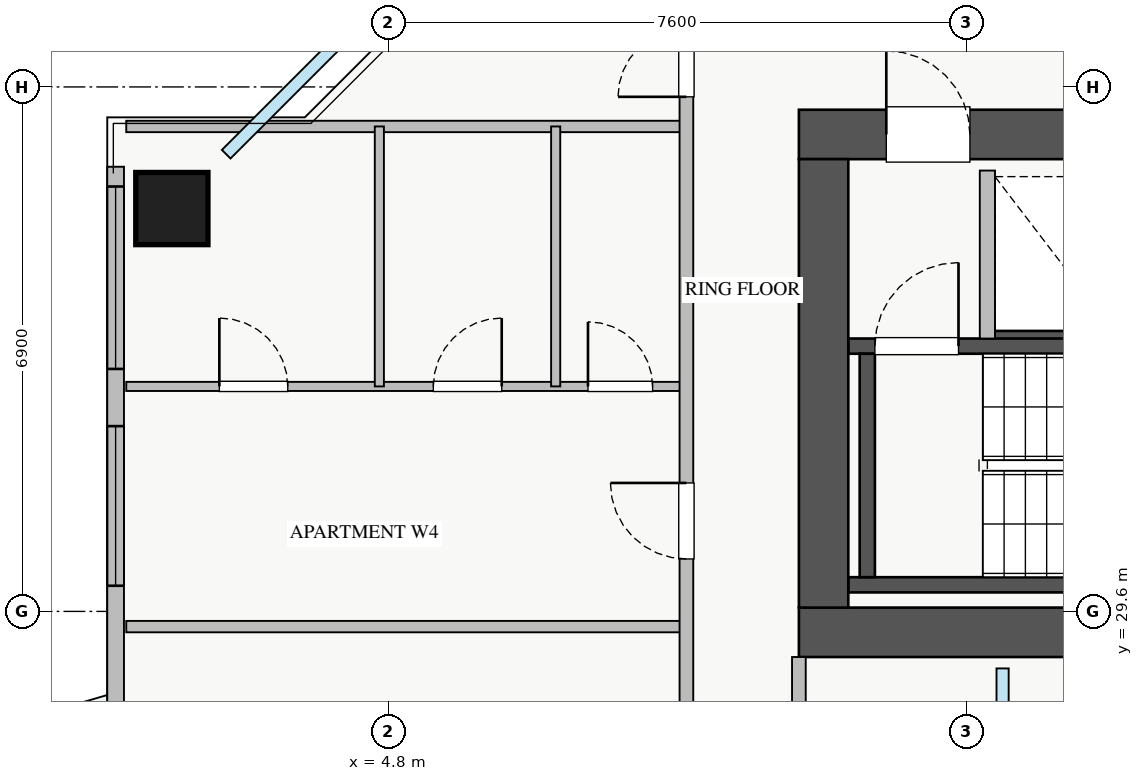
"""IFC4 building model, lengths in metres.
Left out: names, types, materials, properties, quantities, classifications, styles, units other than length and angle.
Written with IfcOpenShell. Run it as: python <this file> out.ifc"""

import sys

from ifc_helpers import new_model, si_unit, direction, frame, frame_2d, origin, origin_2d, place, context, subcontext, project, spatial, rectangle, extrude, source, transform, mapped, element, fill, save


model = new_model("IFC4")
c1 = context("Model", 3, precision=1e-05, world=origin(), true_north=direction((0.0, 1.0)))
c2 = subcontext(c1, "Body", "Model", "MODEL_VIEW")
j1 = project(units=[si_unit("LENGTHUNIT", "METRE"), si_unit("PLANEANGLEUNIT", "RADIAN")], contexts=[c1])
p1 = place(None, origin())
s1 = spatial("IfcSite", under=j1, at=p1, CompositionType="ELEMENT")
p2 = place(p1, origin())
s2 = spatial("IfcBuilding", under=s1, at=p2, CompositionType="ELEMENT")
p3 = place(p2, frame((0.0, 0.0, 179.5)))
s3 = spatial("IfcBuildingStorey", under=s2, at=p3, CompositionType="ELEMENT", Elevation=179.5)
p4 = place(p3, frame((12.68, 33.2, 0.0), z_axis=(0.0, 0.0, 1.0), x_axis=(1.0, 0.0, 0.0)))
e1 = element("IfcWall", 1, at=p4, inside=s3, PredefinedType="SHEAR", context=c2, shape_type="SweptSolid", body=[
    extrude(rectangle(XDim=1.94, YDim=0.18, at=frame_2d((0.97, 0.0))), origin(), (0.0, 0.0, 1.0), 3.07),
])
p5 = place(p3, frame((10.85, 29.95, 0.0), z_axis=(0.0, 0.0, 1.0), x_axis=(1.0, 0.0, 0.0)))
e2 = element("IfcWall", 2, at=p5, inside=s3, PredefinedType="SHEAR", context=c2, shape_type="SweptSolid", body=[
    extrude(rectangle(XDim=7.3, YDim=0.2, at=frame_2d((3.65, 0.0))), origin(), (0.0, 0.0, 1.0), 3.25),
])
p6 = place(p3, frame((10.85, 33.09, 0.0), z_axis=(0.0, 0.0, 1.0), x_axis=(1.0, 0.0, 0.0)))
e3 = element("IfcWall", 3, at=p6, inside=s3, PredefinedType="SHEAR", context=c2, shape_type="SweptSolid", body=[
    extrude(rectangle(XDim=7.3, YDim=0.2, at=frame_2d((3.65, 0.0))), origin(), (0.0, 0.0, 1.0), 3.25),
])
p7 = place(p6, frame((0.35, 0.0, 0.0)))
e4 = element("IfcOpeningElement", 4, at=p7, cuts=e3, PredefinedType="OPENING", context=c2, shape_type="SweptSolid", body=[
    extrude(rectangle(XDim=1.1, YDim=2.05, at=frame_2d((0.55, 1.025))), frame((0.0, 0.11, 0.0), z_axis=(0.0, -1.0, 0.0), x_axis=(1.0, 0.0, 0.0)), (0.0, 0.0, 1.0), 0.22),
])
p8 = place(p3, frame((11.1, 30.05, 0.0), z_axis=(0.0, 0.0, 1.0), x_axis=(0.0, 1.0, 0.0)))
e5 = element("IfcWall", 5, at=p8, inside=s3, PredefinedType="SHEAR", context=c2, shape_type="SweptSolid", body=[
    extrude(rectangle(XDim=2.94, YDim=0.2, at=frame_2d((1.47, 0.0))), origin(), (0.0, 0.0, 1.0), 3.25),
])
p9 = place(p3, frame((10.2, 29.325, 0.0), z_axis=(0.0, 0.0, 1.0), x_axis=(1.0, 0.0, 0.0)))
e6 = element("IfcWall", 6, at=p9, inside=s3, PredefinedType="SHEAR", context=c2, shape_type="SweptSolid", body=[
    extrude(rectangle(XDim=17.6, YDim=0.65, at=frame_2d((8.8, 0.0))), origin(), (0.0, 0.0, 1.0), 3.25),
])
p10 = place(p3, frame((10.2, 35.875, 0.0), z_axis=(0.0, 0.0, 1.0), x_axis=(1.0, 0.0, 0.0)))
e7 = element("IfcWall", 7, at=p10, inside=s3, PredefinedType="SHEAR", context=c2, shape_type="SweptSolid", body=[
    extrude(rectangle(XDim=17.6, YDim=0.65, at=frame_2d((8.8, 0.0))), origin(), (0.0, 0.0, 1.0), 3.25),
])
p11 = place(p10, frame((1.15, 0.0, 0.0)))
e8 = element("IfcOpeningElement", 8, at=p11, cuts=e7, PredefinedType="OPENING", context=c2, shape_type="SweptSolid", body=[
    extrude(rectangle(XDim=1.1, YDim=2.05, at=frame_2d((0.55, 1.025))), frame((0.0, 0.335, 0.0), z_axis=(0.0, -1.0, 0.0), x_axis=(1.0, 0.0, 0.0)), (0.0, 0.0, 1.0), 0.67),
])
p12 = place(p10, frame((8.3, 0.0, 0.0)))
e9 = element("IfcOpeningElement", 9, at=p12, cuts=e7, PredefinedType="OPENING", context=c2, shape_type="SweptSolid", body=[
    extrude(rectangle(XDim=1.1, YDim=2.05, at=frame_2d((0.55, 1.025))), frame((0.0, 0.335, 0.0), z_axis=(0.0, -1.0, 0.0), x_axis=(1.0, 0.0, 0.0)), (0.0, 0.0, 1.0), 0.67),
])
p13 = place(p10, frame((4.9, 0.0, 0.0)))
e10 = element("IfcOpeningElement", 10, at=p13, cuts=e7, PredefinedType="OPENING", context=c2, shape_type="SweptSolid", body=[
    extrude(rectangle(XDim=1.1, YDim=2.05, at=frame_2d((0.55, 1.025))), frame((0.0, 0.335, 0.0), z_axis=(0.0, -1.0, 0.0), x_axis=(1.0, 0.0, 0.0)), (0.0, 0.0, 1.0), 0.67),
])
p14 = place(p10, frame((14.74, 0.0, 0.0)))
e11 = element("IfcOpeningElement", 11, at=p14, cuts=e7, PredefinedType="OPENING", context=c2, shape_type="SweptSolid", body=[
    extrude(rectangle(XDim=1.0, YDim=2.05, at=frame_2d((0.5, 1.025))), frame((0.0, 0.335, 0.0), z_axis=(0.0, -1.0, 0.0), x_axis=(1.0, 0.0, 0.0)), (0.0, 0.0, 1.0), 0.67),
])
p15 = place(p10, frame((10.25, 0.0, 0.0)))
e12 = element("IfcOpeningElement", 12, at=p15, cuts=e7, PredefinedType="OPENING", context=c2, shape_type="SweptSolid", body=[
    extrude(rectangle(XDim=1.0, YDim=2.05, at=frame_2d((0.5, 1.025))), frame((0.0, 0.335, 0.0), z_axis=(0.0, -1.0, 0.0), x_axis=(1.0, 0.0, 0.0)), (0.0, 0.0, 1.0), 0.67),
])
p16 = place(p10, frame((12.7, 0.0, 0.0)))
e13 = element("IfcOpeningElement", 13, at=p16, cuts=e7, PredefinedType="OPENING", context=c2, shape_type="SweptSolid", body=[
    extrude(rectangle(XDim=1.0, YDim=2.05, at=frame_2d((0.5, 1.025))), frame((0.0, 0.335, 0.0), z_axis=(0.0, -1.0, 0.0), x_axis=(1.0, 0.0, 0.0)), (0.0, 0.0, 1.0), 0.67),
])
p17 = place(p3, frame((10.525, 29.65, 0.0), z_axis=(0.0, 0.0, 1.0), x_axis=(0.0, 1.0, 0.0)))
e14 = element("IfcWall", 14, at=p17, inside=s3, PredefinedType="SHEAR", context=c2, shape_type="SweptSolid", body=[
    extrude(rectangle(XDim=5.9, YDim=0.65, at=frame_2d((2.95, 0.0))), origin(), (0.0, 0.0, 1.0), 3.25),
])
m1 = source(origin(), c2, "Body", "SweptSolid", [
    extrude(rectangle(XDim=0.95, YDim=0.95, at=origin_2d()), origin(), (0.0, 0.0, 1.0), 3.25),
])
p18 = place(p3, frame((1.95, 34.9, 0.0), z_axis=(0.0, 0.0, 1.0), x_axis=(1.0, 0.0, 0.0)))
e15 = element("IfcColumn", 15, at=p18, inside=s3, PredefinedType="COLUMN", context=c2, shape_type="MappedRepresentation", body=[
    mapped(m1, transform((0.0, 0.0, 0.0), x_axis=(1.0, 0.0, 0.0), y_axis=(0.0, 1.0, 0.0), z_axis=(0.0, 0.0, 1.0), scale=1.0)),
])
p19 = place(p3, frame((1.21, 10.55, 0.0), z_axis=(0.0, 0.0, 1.0), x_axis=(0.0, 1.0, 0.0)))
e16 = element("IfcWall", 16, at=p19, inside=s3, PredefinedType="STANDARD", context=c2, shape_type="SweptSolid", body=[
    extrude(rectangle(XDim=24.9, YDim=0.22, at=frame_2d((12.45, 0.0))), origin(), (0.0, 0.0, 1.0), 2.61),
])
p20 = place(p19, frame((13.3, 0.0, 0.0)))
e17 = element("IfcOpeningElement", 17, at=p20, cuts=e16, PredefinedType="OPENING", context=c2, shape_type="SweptSolid", body=[
    extrude(rectangle(XDim=1.2, YDim=2.1, at=frame_2d((0.6, 1.05))), frame((0.0, 0.12, 0.0), z_axis=(0.0, -1.0, 0.0), x_axis=(1.0, 0.0, 0.0)), (0.0, 0.0, 1.0), 0.24),
])
p21 = place(p19, frame((2.573, 0.0, 0.9)))
e18 = element("IfcOpeningElement", 18, at=p21, cuts=e16, PredefinedType="OPENING", context=c2, shape_type="SweptSolid", body=[
    extrude(rectangle(XDim=2.1, YDim=1.5, at=frame_2d((1.05, 0.75))), frame((0.0, 0.12, 0.0), z_axis=(0.0, -1.0, 0.0), x_axis=(1.0, 0.0, 0.0)), (0.0, 0.0, 1.0), 0.24),
])
p22 = place(p19, frame((19.387, 0.0, 0.9)))
e19 = element("IfcOpeningElement", 19, at=p22, cuts=e16, PredefinedType="OPENING", context=c2, shape_type="SweptSolid", body=[
    extrude(rectangle(XDim=2.1, YDim=1.5, at=frame_2d((1.05, 0.75))), frame((0.0, 0.12, 0.0), z_axis=(0.0, -1.0, 0.0), x_axis=(1.0, 0.0, 0.0)), (0.0, 0.0, 1.0), 0.24),
])
p23 = place(p19, frame((22.24, 0.0, 0.9)))
e20 = element("IfcOpeningElement", 20, at=p23, cuts=e16, PredefinedType="OPENING", context=c2, shape_type="SweptSolid", body=[
    extrude(rectangle(XDim=2.4, YDim=1.5, at=frame_2d((1.2, 0.75))), frame((0.0, 0.12, 0.0), z_axis=(0.0, -1.0, 0.0), x_axis=(1.0, 0.0, 0.0)), (0.0, 0.0, 1.0), 0.24),
])
p24 = place(p19, frame((0.25, 0.0, 0.9)))
e21 = element("IfcOpeningElement", 21, at=p24, cuts=e16, PredefinedType="OPENING", context=c2, shape_type="SweptSolid", body=[
    extrude(rectangle(XDim=0.9, YDim=1.2, at=frame_2d((0.45, 0.6))), frame((0.0, 0.12, 0.0), z_axis=(0.0, -1.0, 0.0), x_axis=(1.0, 0.0, 0.0)), (0.0, 0.0, 1.0), 0.24),
])
p25 = place(p19, frame((8.01, 0.0, 0.9)))
e22 = element("IfcOpeningElement", 22, at=p25, cuts=e16, PredefinedType="OPENING", context=c2, shape_type="SweptSolid", body=[
    extrude(rectangle(XDim=0.9, YDim=1.2, at=frame_2d((0.45, 0.6))), frame((0.0, 0.12, 0.0), z_axis=(0.0, -1.0, 0.0), x_axis=(1.0, 0.0, 0.0)), (0.0, 0.0, 1.0), 0.24),
])
p26 = place(p19, frame((5.215, 0.0, 0.9)))
e23 = element("IfcOpeningElement", 23, at=p26, cuts=e16, PredefinedType="OPENING", context=c2, shape_type="SweptSolid", body=[
    extrude(rectangle(XDim=0.9, YDim=1.2, at=frame_2d((0.45, 0.6))), frame((0.0, 0.12, 0.0), z_axis=(0.0, -1.0, 0.0), x_axis=(1.0, 0.0, 0.0)), (0.0, 0.0, 1.0), 0.24),
])
p27 = place(p3, frame((12.68, 33.19, 0.0), z_axis=(0.0, 0.0, 1.0), x_axis=(0.0, 1.0, 0.0)))
e24 = element("IfcWall", 24, at=p27, inside=s3, PredefinedType="PARTITIONING", context=c2, shape_type="SweptSolid", body=[
    extrude(rectangle(XDim=2.21, YDim=0.2, at=frame_2d((1.105, 0.0))), origin(), (0.0, 0.0, 1.0), 3.07),
])
p28 = place(p3, frame((1.35, 35.98, 0.0), z_axis=(0.0, 0.0, 1.0), x_axis=(1.0, 0.0, 0.0)))
e25 = element("IfcWall", 25, at=p28, inside=s3, PredefinedType="PARTITIONING", context=c2, shape_type="SweptSolid", body=[
    extrude(rectangle(XDim=7.37, YDim=0.15, at=frame_2d((3.685, 0.0))), origin(), (0.0, 0.0, 1.0), 3.07),
])
p29 = place(p3, frame((1.35, 32.56, 0.0), z_axis=(0.0, 0.0, 1.0), x_axis=(1.0, 0.0, 0.0)))
e26 = element("IfcWall", 26, at=p29, inside=s3, PredefinedType="PLUMBINGWALL", context=c2, shape_type="SweptSolid", body=[
    extrude(rectangle(XDim=7.37, YDim=0.12, at=frame_2d((3.685, 0.0))), origin(), (0.0, 0.0, 1.0), 3.07),
])
p30 = place(p29, frame((1.225, 0.0, 0.0)))
e27 = element("IfcOpeningElement", 27, at=p30, cuts=e26, PredefinedType="OPENING", context=c2, shape_type="SweptSolid", body=[
    extrude(rectangle(XDim=0.9, YDim=2.05, at=frame_2d((0.45, 1.025))), frame((0.0, 0.07, 0.0), z_axis=(0.0, -1.0, 0.0), x_axis=(1.0, 0.0, 0.0)), (0.0, 0.0, 1.0), 0.14),
])
p31 = place(p29, frame((4.04, 0.0, 0.0)))
e28 = element("IfcOpeningElement", 28, at=p31, cuts=e26, PredefinedType="OPENING", context=c2, shape_type="SweptSolid", body=[
    extrude(rectangle(XDim=0.9, YDim=2.05, at=frame_2d((0.45, 1.025))), frame((0.0, 0.07, 0.0), z_axis=(0.0, -1.0, 0.0), x_axis=(1.0, 0.0, 0.0)), (0.0, 0.0, 1.0), 0.14),
])
p32 = place(p29, frame((6.075, 0.0, 0.0)))
e29 = element("IfcOpeningElement", 29, at=p32, cuts=e26, PredefinedType="OPENING", context=c2, shape_type="SweptSolid", body=[
    extrude(rectangle(XDim=0.85, YDim=2.05, at=frame_2d((0.425, 1.025))), frame((0.0, 0.07, 0.0), z_axis=(0.0, -1.0, 0.0), x_axis=(1.0, 0.0, 0.0)), (0.0, 0.0, 1.0), 0.14),
])
p33 = place(p3, frame((4.68, 32.56, 0.0), z_axis=(0.0, 0.0, 1.0), x_axis=(0.0, 1.0, 0.0)))
e30 = element("IfcWall", 30, at=p33, inside=s3, PredefinedType="PLUMBINGWALL", context=c2, shape_type="SweptSolid", body=[
    extrude(rectangle(XDim=3.42, YDim=0.12, at=frame_2d((1.71, 0.0))), origin(), (0.0, 0.0, 1.0), 3.07),
])
p34 = place(p3, frame((7.0, 32.56, 0.0), z_axis=(0.0, 0.0, 1.0), x_axis=(0.0, 1.0, 0.0)))
e31 = element("IfcWall", 31, at=p34, inside=s3, PredefinedType="PLUMBINGWALL", context=c2, shape_type="SweptSolid", body=[
    extrude(rectangle(XDim=3.42, YDim=0.12, at=frame_2d((1.71, 0.0))), origin(), (0.0, 0.0, 1.0), 2.565),
])
p35 = place(p3, frame((1.35, 29.4, 0.0), z_axis=(0.0, 0.0, 1.0), x_axis=(1.0, 0.0, 0.0)))
e32 = element("IfcWall", 32, at=p35, inside=s3, PredefinedType="PARTITIONING", context=c2, shape_type="SweptSolid", body=[
    extrude(rectangle(XDim=7.37, YDim=0.15, at=frame_2d((3.685, 0.0))), origin(), (0.0, 0.0, 1.0), 3.07),
])
p36 = place(p3, frame((8.72, 8.31, 0.0), z_axis=(0.0, 0.0, 1.0), x_axis=(0.0, 1.0, 0.0)))
e33 = element("IfcWall", 33, at=p36, inside=s3, PredefinedType="PARTITIONING", context=c2, shape_type="SweptSolid", body=[
    extrude(rectangle(XDim=29.37, YDim=0.18, at=frame_2d((14.685, 0.0))), origin(), (0.0, 0.0, 1.0), 3.07),
])
p37 = place(p36, frame((28.06, 0.0, 0.0)))
e34 = element("IfcOpeningElement", 34, at=p37, cuts=e33, PredefinedType="OPENING", context=c2, shape_type="SweptSolid", body=[
    extrude(rectangle(XDim=0.9, YDim=2.05, at=frame_2d((0.45, 1.025))), frame((0.0, 0.1, 0.0), z_axis=(0.0, -1.0, 0.0), x_axis=(1.0, 0.0, 0.0)), (0.0, 0.0, 1.0), 0.2),
])
p38 = place(p36, frame((0.24, 0.0, 0.0)))
e35 = element("IfcOpeningElement", 35, at=p38, cuts=e33, PredefinedType="OPENING", context=c2, shape_type="SweptSolid", body=[
    extrude(rectangle(XDim=0.9, YDim=2.05, at=frame_2d((0.45, 1.025))), frame((0.0, 0.1, 0.0), z_axis=(0.0, -1.0, 0.0), x_axis=(1.0, 0.0, 0.0)), (0.0, 0.0, 1.0), 0.2),
])
p39 = place(p36, frame((2.25, 0.0, 0.0)))
e36 = element("IfcOpeningElement", 36, at=p39, cuts=e33, PredefinedType="OPENING", context=c2, shape_type="SweptSolid", body=[
    extrude(rectangle(XDim=1.0, YDim=2.05, at=frame_2d((0.5, 1.025))), frame((0.0, 0.1, 0.0), z_axis=(0.0, -1.0, 0.0), x_axis=(1.0, 0.0, 0.0)), (0.0, 0.0, 1.0), 0.2),
])
p40 = place(p36, frame((7.935, 0.0, 0.0)))
e37 = element("IfcOpeningElement", 37, at=p40, cuts=e33, PredefinedType="OPENING", context=c2, shape_type="SweptSolid", body=[
    extrude(rectangle(XDim=1.0, YDim=2.05, at=frame_2d((0.5, 1.025))), frame((0.0, 0.1, 0.0), z_axis=(0.0, -1.0, 0.0), x_axis=(1.0, 0.0, 0.0)), (0.0, 0.0, 1.0), 0.2),
])
p41 = place(p36, frame((17.3, 0.0, 0.0)))
e38 = element("IfcOpeningElement", 38, at=p41, cuts=e33, PredefinedType="OPENING", context=c2, shape_type="SweptSolid", body=[
    extrude(rectangle(XDim=1.0, YDim=2.05, at=frame_2d((0.5, 1.025))), frame((0.0, 0.1, 0.0), z_axis=(0.0, -1.0, 0.0), x_axis=(1.0, 0.0, 0.0)), (0.0, 0.0, 1.0), 0.2),
])
p42 = place(p36, frame((21.98, 0.0, 0.0)))
e39 = element("IfcOpeningElement", 39, at=p42, cuts=e33, PredefinedType="OPENING", context=c2, shape_type="SweptSolid", body=[
    extrude(rectangle(XDim=1.0, YDim=2.05, at=frame_2d((0.5, 1.025))), frame((0.0, 0.1, 0.0), z_axis=(0.0, -1.0, 0.0), x_axis=(1.0, 0.0, 0.0)), (0.0, 0.0, 1.0), 0.2),
])
p43 = place(p3, frame((10.2, 17.0, 0.0), z_axis=(0.0, 0.0, 1.0), x_axis=(0.0, 1.0, 0.0)))
e40 = element("IfcWall", 40, at=p43, inside=s3, PredefinedType="PARTITIONING", context=c2, shape_type="SweptSolid", body=[
    extrude(rectangle(XDim=12.0, YDim=0.18, at=frame_2d((6.0, 0.0))), origin(), (0.0, 0.0, 1.0), 3.07),
])
p44 = place(p43, frame((1.5, 0.0, 0.0)))
e41 = element("IfcOpeningElement", 41, at=p44, cuts=e40, PredefinedType="OPENING", context=c2, shape_type="SweptSolid", body=[
    extrude(rectangle(XDim=0.85, YDim=2.05, at=frame_2d((0.425, 1.025))), frame((0.0, 0.1, 0.0), z_axis=(0.0, -1.0, 0.0), x_axis=(1.0, 0.0, 0.0)), (0.0, 0.0, 1.0), 0.2),
])
p45 = place(p43, frame((6.5, 0.0, 0.0)))
e42 = element("IfcOpeningElement", 42, at=p45, cuts=e40, PredefinedType="OPENING", context=c2, shape_type="SweptSolid", body=[
    extrude(rectangle(XDim=1.0, YDim=2.05, at=frame_2d((0.5, 1.025))), frame((0.0, 0.1, 0.0), z_axis=(0.0, -1.0, 0.0), x_axis=(1.0, 0.0, 0.0)), (0.0, 0.0, 1.0), 0.2),
])
m2 = source(origin(), c2, "Body", "SweptSolid", [
    extrude(rectangle(XDim=2.1, YDim=1.5, at=frame_2d((1.05, 0.75))), frame((0.0, 0.03, 0.0), z_axis=(0.0, -1.0, 0.0), x_axis=(1.0, 0.0, 0.0)), (0.0, 0.0, 1.0), 0.06),
])
p46 = place(p22, origin())
e43 = element("IfcWindow", 43, at=p46, inside=s3, PartitioningType="TRIPLE_PANEL_VERTICAL", PredefinedType="WINDOW", context=c2, shape_type="MappedRepresentation", body=[
    mapped(m2, transform((0.0, 0.0, 0.0), x_axis=(1.0, 0.0, 0.0), y_axis=(0.0, 1.0, 0.0), z_axis=(0.0, 0.0, 1.0), scale=1.0)),
])
fill(e19, e43)
m3 = source(origin(), c2, "Body", "SweptSolid", [
    extrude(rectangle(XDim=1.1, YDim=2.05, at=frame_2d((0.55, 1.025))), frame((0.0, 0.025, 0.0), z_axis=(0.0, -1.0, 0.0), x_axis=(1.0, 0.0, 0.0)), (0.0, 0.0, 1.0), 0.05),
])
p47 = place(p11, origin())
e44 = element("IfcDoor", 44, at=p47, inside=s3, OperationType="SINGLE_SWING_LEFT", PredefinedType="DOOR", context=c2, shape_type="MappedRepresentation", body=[
    mapped(m3, transform((0.0, 0.0, 0.0), x_axis=(1.0, 0.0, 0.0), y_axis=(0.0, 1.0, 0.0), z_axis=(0.0, 0.0, 1.0), scale=1.0)),
])
fill(e8, e44)
p48 = place(p7, origin())
e45 = element("IfcDoor", 45, at=p48, inside=s3, OperationType="SINGLE_SWING_RIGHT", PredefinedType="DOOR", context=c2, shape_type="MappedRepresentation", body=[
    mapped(m3, transform((0.0, 0.0, 0.0), x_axis=(1.0, 0.0, 0.0), y_axis=(0.0, 1.0, 0.0), z_axis=(0.0, 0.0, 1.0), scale=1.0)),
])
fill(e4, e45)
m4 = source(origin(), c2, "Body", "SweptSolid", [
    extrude(rectangle(XDim=0.9, YDim=2.05, at=frame_2d((0.45, 1.025))), frame((0.0, 0.025, 0.0), z_axis=(0.0, -1.0, 0.0), x_axis=(1.0, 0.0, 0.0)), (0.0, 0.0, 1.0), 0.05),
])
p49 = place(p30, origin())
e46 = element("IfcDoor", 46, at=p49, inside=s3, OperationType="SINGLE_SWING_LEFT", PredefinedType="DOOR", context=c2, shape_type="MappedRepresentation", body=[
    mapped(m4, transform((0.0, 0.0, 0.0), x_axis=(1.0, 0.0, 0.0), y_axis=(0.0, 1.0, 0.0), z_axis=(0.0, 0.0, 1.0), scale=1.0)),
])
fill(e27, e46)
p50 = place(p31, origin())
e47 = element("IfcDoor", 47, at=p50, inside=s3, OperationType="SINGLE_SWING_RIGHT", PredefinedType="DOOR", context=c2, shape_type="MappedRepresentation", body=[
    mapped(m4, transform((0.0, 0.0, 0.0), x_axis=(1.0, 0.0, 0.0), y_axis=(0.0, 1.0, 0.0), z_axis=(0.0, 0.0, 1.0), scale=1.0)),
])
fill(e28, e47)
m5 = source(origin(), c2, "Body", "SweptSolid", [
    extrude(rectangle(XDim=0.85, YDim=2.05, at=frame_2d((0.425, 1.025))), frame((0.0, 0.025, 0.0), z_axis=(0.0, -1.0, 0.0), x_axis=(1.0, 0.0, 0.0)), (0.0, 0.0, 1.0), 0.05),
])
p51 = place(p32, origin())
e48 = element("IfcDoor", 48, at=p51, inside=s3, OperationType="SINGLE_SWING_LEFT", PredefinedType="DOOR", context=c2, shape_type="MappedRepresentation", body=[
    mapped(m5, transform((0.0, 0.0, 0.0), x_axis=(1.0, 0.0, 0.0), y_axis=(0.0, 1.0, 0.0), z_axis=(0.0, 0.0, 1.0), scale=1.0)),
])
fill(e29, e48)
p52 = place(p37, origin())
e49 = element("IfcDoor", 49, at=p52, inside=s3, OperationType="SINGLE_SWING_LEFT", PredefinedType="DOOR", context=c2, shape_type="MappedRepresentation", body=[
    mapped(m4, transform((0.0, 0.0, 0.0), x_axis=(1.0, 0.0, 0.0), y_axis=(0.0, 1.0, 0.0), z_axis=(0.0, 0.0, 1.0), scale=1.0)),
])
fill(e34, e49)
m6 = source(origin(), c2, "Body", "SweptSolid", [
    extrude(rectangle(XDim=1.0, YDim=2.05, at=frame_2d((0.5, 1.025))), frame((0.0, 0.025, 0.0), z_axis=(0.0, -1.0, 0.0), x_axis=(1.0, 0.0, 0.0)), (0.0, 0.0, 1.0), 0.05),
])
p53 = place(p42, origin())
e50 = element("IfcDoor", 50, at=p53, inside=s3, OperationType="SINGLE_SWING_RIGHT", PredefinedType="DOOR", context=c2, shape_type="MappedRepresentation", body=[
    mapped(m6, transform((0.0, 0.0, 0.0), x_axis=(1.0, 0.0, 0.0), y_axis=(0.0, 1.0, 0.0), z_axis=(0.0, 0.0, 1.0), scale=1.0)),
])
fill(e39, e50)
m7 = source(origin(), c2, "Body", "SweptSolid", [
    extrude(rectangle(XDim=2.4, YDim=1.5, at=frame_2d((1.2, 0.75))), frame((0.0, 0.03, 0.0), z_axis=(0.0, -1.0, 0.0), x_axis=(1.0, 0.0, 0.0)), (0.0, 0.0, 1.0), 0.06),
])
p54 = place(p23, origin())
e51 = element("IfcWindow", 51, at=p54, inside=s3, PartitioningType="TRIPLE_PANEL_VERTICAL", PredefinedType="WINDOW", context=c2, shape_type="MappedRepresentation", body=[
    mapped(m7, transform((0.0, 0.0, 0.0), x_axis=(1.0, 0.0, 0.0), y_axis=(0.0, 1.0, 0.0), z_axis=(0.0, 0.0, 1.0), scale=1.0)),
])
fill(e20, e51)
save(model, sys.argv[1])
